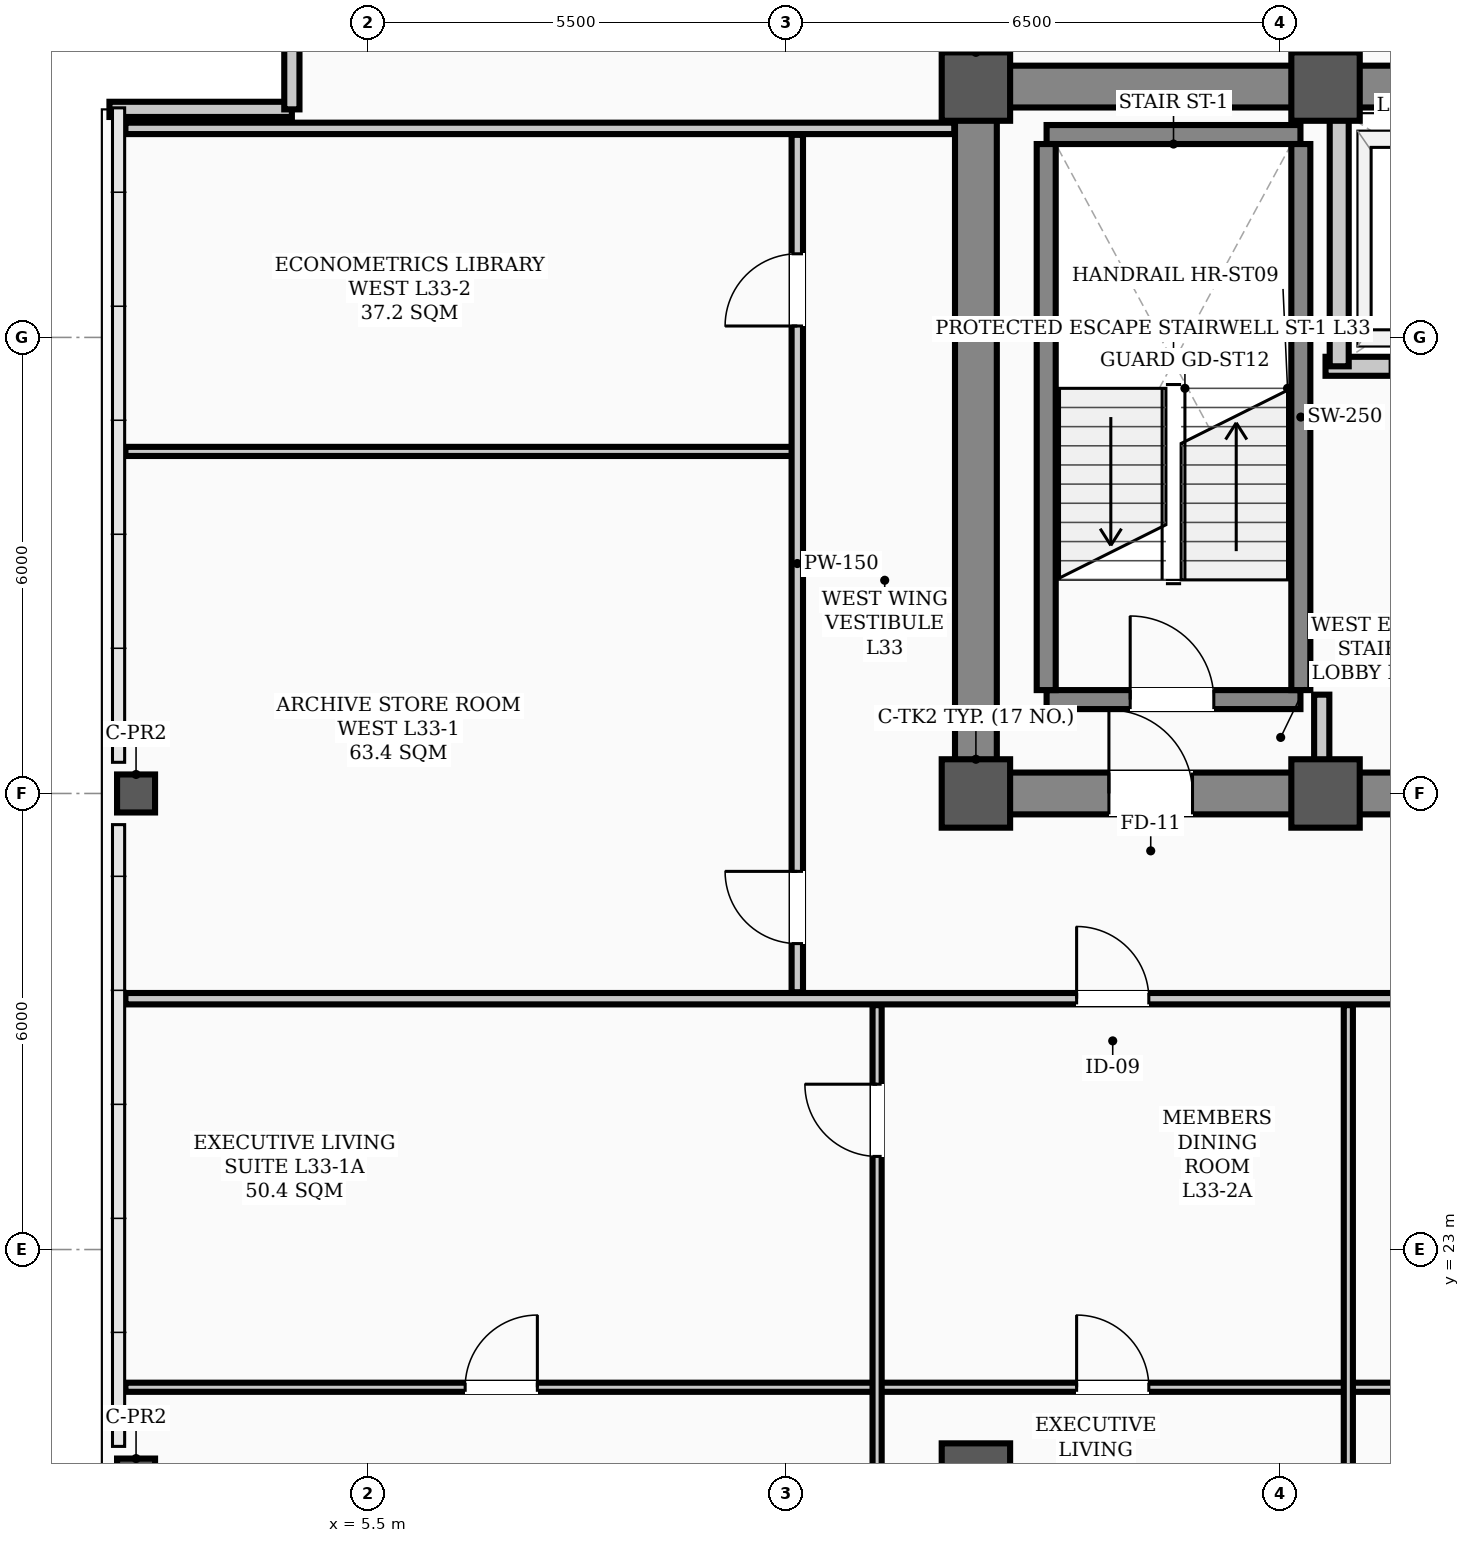
"""IFC4 building model, lengths in metres.
Left out: names, types, materials, properties, quantities, classifications, styles, units other than length and angle.
Written with IfcOpenShell. Run it as: python <this file> out.ifc"""

import sys

from ifc_helpers import new_model, si_unit, direction, frame, frame_2d, origin, origin_2d, place, context, subcontext, project, spatial, rectangle, hollow_rectangle, extrude, element, fill, save


model = new_model("IFC4")
c1 = context("Model", 3, precision=1e-05, world=origin(), true_north=direction((0.0, 1.0)))
c2 = subcontext(c1, "Body", "Model", "MODEL_VIEW")
j1 = project(units=[si_unit("LENGTHUNIT", "METRE"), si_unit("PLANEANGLEUNIT", "RADIAN")], contexts=[c1])
p1 = place(None, origin())
s1 = spatial("IfcSite", under=j1, at=p1, CompositionType="ELEMENT")
p2 = place(p1, origin())
s2 = spatial("IfcBuilding", under=s1, at=p2, CompositionType="ELEMENT")
p3 = place(p2, frame((0.0, 0.0, 134.4)))
s3 = spatial("IfcBuildingStorey", under=s2, at=p3, CompositionType="ELEMENT", Elevation=134.4)
for number, where, z_axis, x_axis in (
    (1, (13.5, 29.0, 0.0), (0.0, 0.0, 1.0), (1.0, 0.0, 0.0)),
    (2, (13.5, 38.3, 0.0), (0.0, 0.0, 1.0), (1.0, 0.0, 0.0)),
    (3, (18.1, 29.0, 0.0), (0.0, 0.0, 1.0), (1.0, 0.0, 0.0)),
    (4, (18.1, 38.3, 0.0), (0.0, 0.0, 1.0), (1.0, 0.0, 0.0)),
    (5, (13.5, 20.0, 0.0), (0.0, 0.0, 1.0), (1.0, 0.0, 0.0)),
):
    element("IfcColumn", number, at=place(p3, frame(where, z_axis=z_axis, x_axis=x_axis)), inside=s3, PredefinedType="COLUMN", context=c2, shape_type="SweptSolid", body=[
        extrude(hollow_rectangle(XDim=0.9, YDim=0.9, WallThickness=0.035, InnerFilletRadius=0.017, OuterFilletRadius=0.052, at=origin_2d()), origin(), (0.0, 0.0, 1.0), 3.9),
    ])
for number, where, z_axis, x_axis in (
    (6, (2.45, 20.0, 0.0), (0.0, 0.0, 1.0), (1.0, 0.0, 0.0)),
    (7, (2.45, 29.0, 0.0), (0.0, 0.0, 1.0), (1.0, 0.0, 0.0)),
):
    element("IfcColumn", number, at=place(p3, frame(where, z_axis=z_axis, x_axis=x_axis)), inside=s3, PredefinedType="COLUMN", context=c2, shape_type="SweptSolid", body=[
        extrude(hollow_rectangle(XDim=0.5, YDim=0.5, WallThickness=0.024, InnerFilletRadius=0.012, OuterFilletRadius=0.036, at=origin_2d()), origin(), (0.0, 0.0, 1.0), 3.9),
    ])
for number, where, z_axis, x_axis in (
    (8, (2.1, 38.0, 0.0), (0.0, 0.0, 1.0), (1.0, 0.0, 0.0)),
    (9, (4.5, 38.0, 0.0), (0.0, 0.0, 1.0), (0.0, 1.0, 0.0)),
):
    element("IfcWall", number, at=place(p3, frame(where, z_axis=z_axis, x_axis=x_axis)), inside=s3, PredefinedType="PARAPET", context=c2, shape_type="SweptSolid", body=[
        extrude(rectangle(XDim=2.4, YDim=0.2, at=frame_2d((1.2, 0.0))), origin(), (0.0, 0.0, 1.0), 1.2),
    ])
p4 = place(p3, frame((13.5, 29.0, 0.0), z_axis=(0.0, 0.0, 1.0), x_axis=(1.0, 0.0, 0.0)))
e10 = element("IfcWall", 10, at=p4, inside=s3, PredefinedType="SHEAR", context=c2, shape_type="SweptSolid", body=[
    extrude(rectangle(XDim=30.5, YDim=0.55, at=frame_2d((15.25, 0.0))), origin(), (0.0, 0.0, 1.0), 3.72),
])
p5 = place(p4, frame((1.75, 0.0, 0.0)))
e11 = element("IfcOpeningElement", 11, at=p5, cuts=e10, PredefinedType="OPENING", context=c2, shape_type="SweptSolid", body=[
    extrude(rectangle(XDim=1.1, YDim=2.08, at=frame_2d((0.55, 1.04))), frame((0.0, 0.285, 0.0), z_axis=(0.0, -1.0, 0.0), x_axis=(1.0, 0.0, 0.0)), (0.0, 0.0, 1.0), 0.57),
])
p6 = place(p4, frame((26.7, 0.0, 0.0)))
e12 = element("IfcOpeningElement", 12, at=p6, cuts=e10, PredefinedType="OPENING", context=c2, shape_type="SweptSolid", body=[
    extrude(rectangle(XDim=1.1, YDim=2.08, at=frame_2d((0.55, 1.04))), frame((0.0, 0.285, 0.0), z_axis=(0.0, -1.0, 0.0), x_axis=(1.0, 0.0, 0.0)), (0.0, 0.0, 1.0), 0.57),
])
p7 = place(p4, frame((6.8, 0.0, 0.0)))
e13 = element("IfcOpeningElement", 13, at=p7, cuts=e10, PredefinedType="OPENING", context=c2, shape_type="SweptSolid", body=[
    extrude(rectangle(XDim=1.1, YDim=2.08, at=frame_2d((0.55, 1.04))), frame((0.0, 0.285, 0.0), z_axis=(0.0, -1.0, 0.0), x_axis=(1.0, 0.0, 0.0)), (0.0, 0.0, 1.0), 0.57),
])
p8 = place(p4, frame((13.2, 0.0, 0.0)))
e14 = element("IfcOpeningElement", 14, at=p8, cuts=e10, PredefinedType="OPENING", context=c2, shape_type="SweptSolid", body=[
    extrude(rectangle(XDim=1.6, YDim=2.08, at=frame_2d((0.8, 1.04))), frame((0.0, 0.285, 0.0), z_axis=(0.0, -1.0, 0.0), x_axis=(1.0, 0.0, 0.0)), (0.0, 0.0, 1.0), 0.57),
])
p9 = place(p4, frame((19.5, 0.0, 0.0)))
e15 = element("IfcOpeningElement", 15, at=p9, cuts=e10, PredefinedType="OPENING", context=c2, shape_type="SweptSolid", body=[
    extrude(rectangle(XDim=0.9, YDim=2.08, at=frame_2d((0.45, 1.04))), frame((0.0, 0.285, 0.0), z_axis=(0.0, -1.0, 0.0), x_axis=(1.0, 0.0, 0.0)), (0.0, 0.0, 1.0), 0.57),
])
p10 = place(p4, frame((21.55, 0.0, 0.0)))
e16 = element("IfcOpeningElement", 16, at=p10, cuts=e10, PredefinedType="OPENING", context=c2, shape_type="SweptSolid", body=[
    extrude(rectangle(XDim=0.9, YDim=2.08, at=frame_2d((0.45, 1.04))), frame((0.0, 0.285, 0.0), z_axis=(0.0, -1.0, 0.0), x_axis=(1.0, 0.0, 0.0)), (0.0, 0.0, 1.0), 0.57),
])
p11 = place(p3, frame((13.5, 38.3, 0.0), z_axis=(0.0, 0.0, 1.0), x_axis=(1.0, 0.0, 0.0)))
e17 = element("IfcWall", 17, at=p11, inside=s3, PredefinedType="SHEAR", context=c2, shape_type="SweptSolid", body=[
    extrude(rectangle(XDim=30.5, YDim=0.55, at=frame_2d((15.25, 0.0))), origin(), (0.0, 0.0, 1.0), 3.72),
])
p12 = place(p3, frame((13.5, 29.35, 0.0), z_axis=(0.0, 0.0, 1.0), x_axis=(0.0, 1.0, 0.0)))
e18 = element("IfcWall", 18, at=p12, inside=s3, PredefinedType="SHEAR", context=c2, shape_type="SweptSolid", body=[
    extrude(rectangle(XDim=8.6, YDim=0.55, at=frame_2d((4.3, 0.0))), origin(), (0.0, 0.0, 1.0), 3.72),
])
p13 = place(p3, frame((14.43, 30.235, 0.0), z_axis=(0.0, 0.0, 1.0), x_axis=(1.0, 0.0, 0.0)))
e19 = element("IfcWall", 19, at=p13, inside=s3, PredefinedType="STANDARD", context=c2, shape_type="SweptSolid", body=[
    extrude(rectangle(XDim=3.34, YDim=0.25, at=frame_2d((1.67, 0.0))), origin(), (0.0, 0.0, 1.0), 3.72),
])
p14 = place(p13, frame((1.1, 0.0, 0.0)))
e20 = element("IfcOpeningElement", 20, at=p14, cuts=e19, PredefinedType="OPENING", context=c2, shape_type="SweptSolid", body=[
    extrude(rectangle(XDim=1.1, YDim=2.08, at=frame_2d((0.55, 1.04))), frame((0.0, 0.135, 0.0), z_axis=(0.0, -1.0, 0.0), x_axis=(1.0, 0.0, 0.0)), (0.0, 0.0, 1.0), 0.27),
])
p15 = place(p3, frame((14.43, 37.669, 0.0), z_axis=(0.0, 0.0, 1.0), x_axis=(1.0, 0.0, 0.0)))
e21 = element("IfcWall", 21, at=p15, inside=s3, PredefinedType="STANDARD", context=c2, shape_type="SweptSolid", body=[
    extrude(rectangle(XDim=3.34, YDim=0.25, at=frame_2d((1.67, 0.0))), origin(), (0.0, 0.0, 1.0), 3.72),
])
for number, where, z_axis, x_axis in (
    (22, (14.425, 30.36, 0.0), (0.0, 0.0, 1.0), (0.0, 1.0, 0.0)),
    (23, (17.775, 30.36, 0.0), (0.0, 0.0, 1.0), (0.0, 1.0, 0.0)),
):
    element("IfcWall", number, at=place(p3, frame(where, z_axis=z_axis, x_axis=x_axis)), inside=s3, PredefinedType="STANDARD", context=c2, shape_type="SweptSolid", body=[
        extrude(rectangle(XDim=7.184, YDim=0.25, at=frame_2d((3.592, 0.0))), origin(), (0.0, 0.0, 1.0), 3.72),
    ])
p16 = place(p3, frame((18.1, 34.62, 0.0), z_axis=(0.0, 0.0, 1.0), x_axis=(1.0, 0.0, 0.0)))
e24 = element("IfcWall", 24, at=p16, inside=s3, PredefinedType="STANDARD", context=c2, shape_type="SweptSolid", body=[
    extrude(rectangle(XDim=5.35, YDim=0.25, at=frame_2d((2.675, 0.0))), origin(), (0.0, 0.0, 1.0), 3.72),
])
p17 = place(p16, frame((0.85, 0.0, 0.0)))
e25 = element("IfcOpeningElement", 25, at=p17, cuts=e24, PredefinedType="OPENING", context=c2, shape_type="SweptSolid", body=[
    extrude(rectangle(XDim=1.1, YDim=2.08, at=frame_2d((0.55, 1.04))), frame((0.0, 0.135, 0.0), z_axis=(0.0, -1.0, 0.0), x_axis=(1.0, 0.0, 0.0)), (0.0, 0.0, 1.0), 0.27),
])
p18 = place(p16, frame((3.45, 0.0, 0.0)))
e26 = element("IfcOpeningElement", 26, at=p18, cuts=e24, PredefinedType="OPENING", context=c2, shape_type="SweptSolid", body=[
    extrude(rectangle(XDim=1.1, YDim=2.08, at=frame_2d((0.55, 1.04))), frame((0.0, 0.135, 0.0), z_axis=(0.0, -1.0, 0.0), x_axis=(1.0, 0.0, 0.0)), (0.0, 0.0, 1.0), 0.27),
])
p19 = place(p3, frame((18.28, 34.62, 0.0), z_axis=(0.0, 0.0, 1.0), x_axis=(0.0, 1.0, 0.0)))
e27 = element("IfcWall", 27, at=p19, inside=s3, PredefinedType="STANDARD", context=c2, shape_type="SweptSolid", body=[
    extrude(rectangle(XDim=3.33, YDim=0.25, at=frame_2d((1.665, 0.0))), origin(), (0.0, 0.0, 1.0), 3.72),
])
p20 = place(p3, frame((2.31, 26.3, 0.0), z_axis=(0.0, 0.0, 1.0), x_axis=(1.0, 0.0, 0.0)))
e28 = element("IfcWall", 28, at=p20, inside=s3, PredefinedType="PARTITIONING", context=c2, shape_type="SweptSolid", body=[
    extrude(rectangle(XDim=46.38, YDim=0.15, at=frame_2d((23.19, 0.0))), origin(), (0.0, 0.0, 1.0), 3.1),
])
p21 = place(p20, frame((12.515, 0.0, 0.0)))
e29 = element("IfcOpeningElement", 29, at=p21, cuts=e28, PredefinedType="OPENING", context=c2, shape_type="SweptSolid", body=[
    extrude(rectangle(XDim=0.95, YDim=2.08, at=frame_2d((0.475, 1.04))), frame((0.0, 0.085, 0.0), z_axis=(0.0, -1.0, 0.0), x_axis=(1.0, 0.0, 0.0)), (0.0, 0.0, 1.0), 0.17),
])
p22 = place(p20, frame((18.615, 0.0, 0.0)))
e30 = element("IfcOpeningElement", 30, at=p22, cuts=e28, PredefinedType="OPENING", context=c2, shape_type="SweptSolid", body=[
    extrude(rectangle(XDim=0.95, YDim=2.08, at=frame_2d((0.475, 1.04))), frame((0.0, 0.085, 0.0), z_axis=(0.0, -1.0, 0.0), x_axis=(1.0, 0.0, 0.0)), (0.0, 0.0, 1.0), 0.17),
])
p23 = place(p20, frame((26.115, 0.0, 0.0)))
e31 = element("IfcOpeningElement", 31, at=p23, cuts=e28, PredefinedType="OPENING", context=c2, shape_type="SweptSolid", body=[
    extrude(rectangle(XDim=0.95, YDim=2.08, at=frame_2d((0.475, 1.04))), frame((0.0, 0.085, 0.0), z_axis=(0.0, -1.0, 0.0), x_axis=(1.0, 0.0, 0.0)), (0.0, 0.0, 1.0), 0.17),
])
p24 = place(p20, frame((31.665, 0.0, 0.0)))
e32 = element("IfcOpeningElement", 32, at=p24, cuts=e28, PredefinedType="OPENING", context=c2, shape_type="SweptSolid", body=[
    extrude(rectangle(XDim=0.95, YDim=2.08, at=frame_2d((0.475, 1.04))), frame((0.0, 0.085, 0.0), z_axis=(0.0, -1.0, 0.0), x_axis=(1.0, 0.0, 0.0)), (0.0, 0.0, 1.0), 0.17),
])
p25 = place(p20, frame((43.06, 0.0, 0.0)))
e33 = element("IfcOpeningElement", 33, at=p25, cuts=e28, PredefinedType="OPENING", context=c2, shape_type="SweptSolid", body=[
    extrude(rectangle(XDim=0.95, YDim=2.08, at=frame_2d((0.475, 1.04))), frame((0.0, 0.085, 0.0), z_axis=(0.0, -1.0, 0.0), x_axis=(1.0, 0.0, 0.0)), (0.0, 0.0, 1.0), 0.17),
])
p26 = place(p3, frame((2.31, 37.75, 0.0), z_axis=(0.0, 0.0, 1.0), x_axis=(1.0, 0.0, 0.0)))
e34 = element("IfcWall", 34, at=p26, inside=s3, PredefinedType="PARTITIONING", context=c2, shape_type="SweptSolid", body=[
    extrude(rectangle(XDim=10.905, YDim=0.15, at=frame_2d((5.453, 0.0))), origin(), (0.0, 0.0, 1.0), 2.3),
])
p27 = place(p3, frame((2.31, 21.188, 0.0), z_axis=(0.0, 0.0, 1.0), x_axis=(1.0, 0.0, 0.0)))
e35 = element("IfcWall", 35, at=p27, inside=s3, PredefinedType="PARTITIONING", context=c2, shape_type="SweptSolid", body=[
    extrude(rectangle(XDim=9.89, YDim=0.12, at=frame_2d((4.945, 0.0))), origin(), (0.0, 0.0, 1.0), 3.212),
])
p28 = place(p27, frame((4.47, 0.0, 0.0)))
e36 = element("IfcOpeningElement", 36, at=p28, cuts=e35, PredefinedType="OPENING", context=c2, shape_type="SweptSolid", body=[
    extrude(rectangle(XDim=0.95, YDim=2.08, at=frame_2d((0.475, 1.04))), frame((0.0, 0.07, 0.0), z_axis=(0.0, -1.0, 0.0), x_axis=(1.0, 0.0, 0.0)), (0.0, 0.0, 1.0), 0.14),
])
p29 = place(p3, frame((12.2, 21.188, 0.0), z_axis=(0.0, 0.0, 1.0), x_axis=(1.0, 0.0, 0.0)))
e37 = element("IfcWall", 37, at=p29, inside=s3, PredefinedType="PARTITIONING", context=c2, shape_type="SweptSolid", body=[
    extrude(rectangle(XDim=6.2, YDim=0.12, at=frame_2d((3.1, 0.0))), origin(), (0.0, 0.0, 1.0), 3.1),
])
p30 = place(p29, frame((2.625, 0.0, 0.0)))
e38 = element("IfcOpeningElement", 38, at=p30, cuts=e37, PredefinedType="OPENING", context=c2, shape_type="SweptSolid", body=[
    extrude(rectangle(XDim=0.95, YDim=2.08, at=frame_2d((0.475, 1.04))), frame((0.0, 0.07, 0.0), z_axis=(0.0, -1.0, 0.0), x_axis=(1.0, 0.0, 0.0)), (0.0, 0.0, 1.0), 0.14),
])
p31 = place(p3, frame((18.4, 21.188, 0.0), z_axis=(0.0, 0.0, 1.0), x_axis=(1.0, 0.0, 0.0)))
e39 = element("IfcWall", 39, at=p31, inside=s3, PredefinedType="PARTITIONING", context=c2, shape_type="SweptSolid", body=[
    extrude(rectangle(XDim=6.0, YDim=0.12, at=frame_2d((3.0, 0.0))), origin(), (0.0, 0.0, 1.0), 3.1),
])
p32 = place(p31, frame((2.525, 0.0, 0.0)))
e40 = element("IfcOpeningElement", 40, at=p32, cuts=e39, PredefinedType="OPENING", context=c2, shape_type="SweptSolid", body=[
    extrude(rectangle(XDim=0.95, YDim=2.08, at=frame_2d((0.475, 1.04))), frame((0.0, 0.07, 0.0), z_axis=(0.0, -1.0, 0.0), x_axis=(1.0, 0.0, 0.0)), (0.0, 0.0, 1.0), 0.14),
])
p33 = place(p3, frame((2.31, 33.5, 0.0), z_axis=(0.0, 0.0, 1.0), x_axis=(1.0, 0.0, 0.0)))
e41 = element("IfcWall", 41, at=p33, inside=s3, PredefinedType="PARTITIONING", context=c2, shape_type="SweptSolid", body=[
    extrude(rectangle(XDim=8.84, YDim=0.12, at=frame_2d((4.42, 0.0))), origin(), (0.0, 0.0, 1.0), 3.72),
])
p34 = place(p3, frame((18.05, 29.285, 0.0), z_axis=(0.0, 0.0, 1.0), x_axis=(0.0, 1.0, 0.0)))
e42 = element("IfcWall", 42, at=p34, inside=s3, PredefinedType="STANDARD", context=c2, shape_type="SweptSolid", body=[
    extrude(rectangle(XDim=1.015, YDim=0.2, at=frame_2d((0.508, 0.0))), origin(), (0.0, 0.0, 1.0), 3.3),
])
p35 = place(p3, frame((11.15, 26.385, 0.0), z_axis=(0.0, 0.0, 1.0), x_axis=(0.0, 1.0, 0.0)))
e43 = element("IfcWall", 43, at=p35, inside=s3, PredefinedType="PARTITIONING", context=c2, shape_type="SweptSolid", body=[
    extrude(rectangle(XDim=11.28, YDim=0.15, at=frame_2d((5.64, 0.0))), origin(), (0.0, 0.0, 1.0), 3.0),
])
p36 = place(p35, frame((0.64, 0.0, 0.0)))
e44 = element("IfcOpeningElement", 44, at=p36, cuts=e43, PredefinedType="OPENING", context=c2, shape_type="SweptSolid", body=[
    extrude(rectangle(XDim=0.95, YDim=2.08, at=frame_2d((0.475, 1.04))), frame((0.0, 0.085, 0.0), z_axis=(0.0, -1.0, 0.0), x_axis=(1.0, 0.0, 0.0)), (0.0, 0.0, 1.0), 0.17),
])
p37 = place(p35, frame((8.765, 0.0, 0.0)))
e45 = element("IfcOpeningElement", 45, at=p37, cuts=e43, PredefinedType="OPENING", context=c2, shape_type="SweptSolid", body=[
    extrude(rectangle(XDim=0.95, YDim=2.08, at=frame_2d((0.475, 1.04))), frame((0.0, 0.085, 0.0), z_axis=(0.0, -1.0, 0.0), x_axis=(1.0, 0.0, 0.0)), (0.0, 0.0, 1.0), 0.17),
])
p38 = place(p3, frame((12.2, 10.81, 0.0), z_axis=(0.0, 0.0, 1.0), x_axis=(0.0, 1.0, 0.0)))
e46 = element("IfcWall", 46, at=p38, inside=s3, PredefinedType="PARTITIONING", context=c2, shape_type="SweptSolid", body=[
    extrude(rectangle(XDim=15.405, YDim=0.12, at=frame_2d((7.703, 0.0))), origin(), (0.0, 0.0, 1.0), 3.0),
])
p39 = place(p38, frame((13.415, 0.0, 0.0)))
e47 = element("IfcOpeningElement", 47, at=p39, cuts=e46, PredefinedType="OPENING", context=c2, shape_type="SweptSolid", body=[
    extrude(rectangle(XDim=0.95, YDim=2.08, at=frame_2d((0.475, 1.04))), frame((0.0, 0.07, 0.0), z_axis=(0.0, -1.0, 0.0), x_axis=(1.0, 0.0, 0.0)), (0.0, 0.0, 1.0), 0.14),
])
p40 = place(p3, frame((18.4, 10.81, 0.0), z_axis=(0.0, 0.0, 1.0), x_axis=(0.0, 1.0, 0.0)))
e48 = element("IfcWall", 48, at=p40, inside=s3, PredefinedType="PARTITIONING", context=c2, shape_type="SweptSolid", body=[
    extrude(rectangle(XDim=15.405, YDim=0.12, at=frame_2d((7.703, 0.0))), origin(), (0.0, 0.0, 1.0), 3.0),
])
p41 = place(p14, origin())
e49 = element("IfcDoor", 49, at=p41, inside=s3, OperationType="SINGLE_SWING_LEFT", PredefinedType="DOOR", context=c2, shape_type="SweptSolid", body=[
    extrude(rectangle(XDim=1.1, YDim=2.08, at=frame_2d((0.55, 1.04))), frame((0.0, 0.025, 0.0), z_axis=(0.0, -1.0, 0.0), x_axis=(1.0, 0.0, 0.0)), (0.0, 0.0, 1.0), 0.05),
])
fill(e20, e49)
p42 = place(p5, origin())
e50 = element("IfcDoor", 50, at=p42, inside=s3, OperationType="SINGLE_SWING_LEFT", PredefinedType="DOOR", context=c2, shape_type="SweptSolid", body=[
    extrude(rectangle(XDim=1.1, YDim=2.08, at=frame_2d((0.55, 1.04))), frame((0.0, 0.025, 0.0), z_axis=(0.0, -1.0, 0.0), x_axis=(1.0, 0.0, 0.0)), (0.0, 0.0, 1.0), 0.05),
])
fill(e11, e50)
p43 = place(p28, origin())
e51 = element("IfcDoor", 51, at=p43, inside=s3, OperationType="SINGLE_SWING_RIGHT", PredefinedType="DOOR", context=c2, shape_type="SweptSolid", body=[
    extrude(rectangle(XDim=0.95, YDim=2.08, at=frame_2d((0.475, 1.04))), frame((0.0, 0.025, 0.0), z_axis=(0.0, -1.0, 0.0), x_axis=(1.0, 0.0, 0.0)), (0.0, 0.0, 1.0), 0.05),
])
fill(e36, e51)
p44 = place(p39, origin())
e52 = element("IfcDoor", 52, at=p44, inside=s3, OperationType="SINGLE_SWING_RIGHT", PredefinedType="DOOR", context=c2, shape_type="SweptSolid", body=[
    extrude(rectangle(XDim=0.95, YDim=2.08, at=frame_2d((0.475, 1.04))), frame((0.0, 0.025, 0.0), z_axis=(0.0, -1.0, 0.0), x_axis=(1.0, 0.0, 0.0)), (0.0, 0.0, 1.0), 0.05),
])
fill(e47, e52)
p45 = place(p30, origin())
e53 = element("IfcDoor", 53, at=p45, inside=s3, OperationType="SINGLE_SWING_LEFT", PredefinedType="DOOR", context=c2, shape_type="SweptSolid", body=[
    extrude(rectangle(XDim=0.95, YDim=2.08, at=frame_2d((0.475, 1.04))), frame((0.0, 0.025, 0.0), z_axis=(0.0, -1.0, 0.0), x_axis=(1.0, 0.0, 0.0)), (0.0, 0.0, 1.0), 0.05),
])
fill(e38, e53)
p46 = place(p21, origin())
e54 = element("IfcDoor", 54, at=p46, inside=s3, OperationType="SINGLE_SWING_LEFT", PredefinedType="DOOR", context=c2, shape_type="SweptSolid", body=[
    extrude(rectangle(XDim=0.95, YDim=2.08, at=frame_2d((0.475, 1.04))), frame((0.0, 0.025, 0.0), z_axis=(0.0, -1.0, 0.0), x_axis=(1.0, 0.0, 0.0)), (0.0, 0.0, 1.0), 0.05),
])
fill(e29, e54)
p47 = place(p36, origin())
e55 = element("IfcDoor", 55, at=p47, inside=s3, OperationType="SINGLE_SWING_RIGHT", PredefinedType="DOOR", context=c2, shape_type="SweptSolid", body=[
    extrude(rectangle(XDim=0.95, YDim=2.08, at=frame_2d((0.475, 1.04))), frame((0.0, 0.025, 0.0), z_axis=(0.0, -1.0, 0.0), x_axis=(1.0, 0.0, 0.0)), (0.0, 0.0, 1.0), 0.05),
])
fill(e44, e55)
p48 = place(p37, origin())
e56 = element("IfcDoor", 56, at=p48, inside=s3, OperationType="SINGLE_SWING_LEFT", PredefinedType="DOOR", context=c2, shape_type="SweptSolid", body=[
    extrude(rectangle(XDim=0.95, YDim=2.08, at=frame_2d((0.475, 1.04))), frame((0.0, 0.025, 0.0), z_axis=(0.0, -1.0, 0.0), x_axis=(1.0, 0.0, 0.0)), (0.0, 0.0, 1.0), 0.05),
])
fill(e45, e56)
save(model, sys.argv[1])
